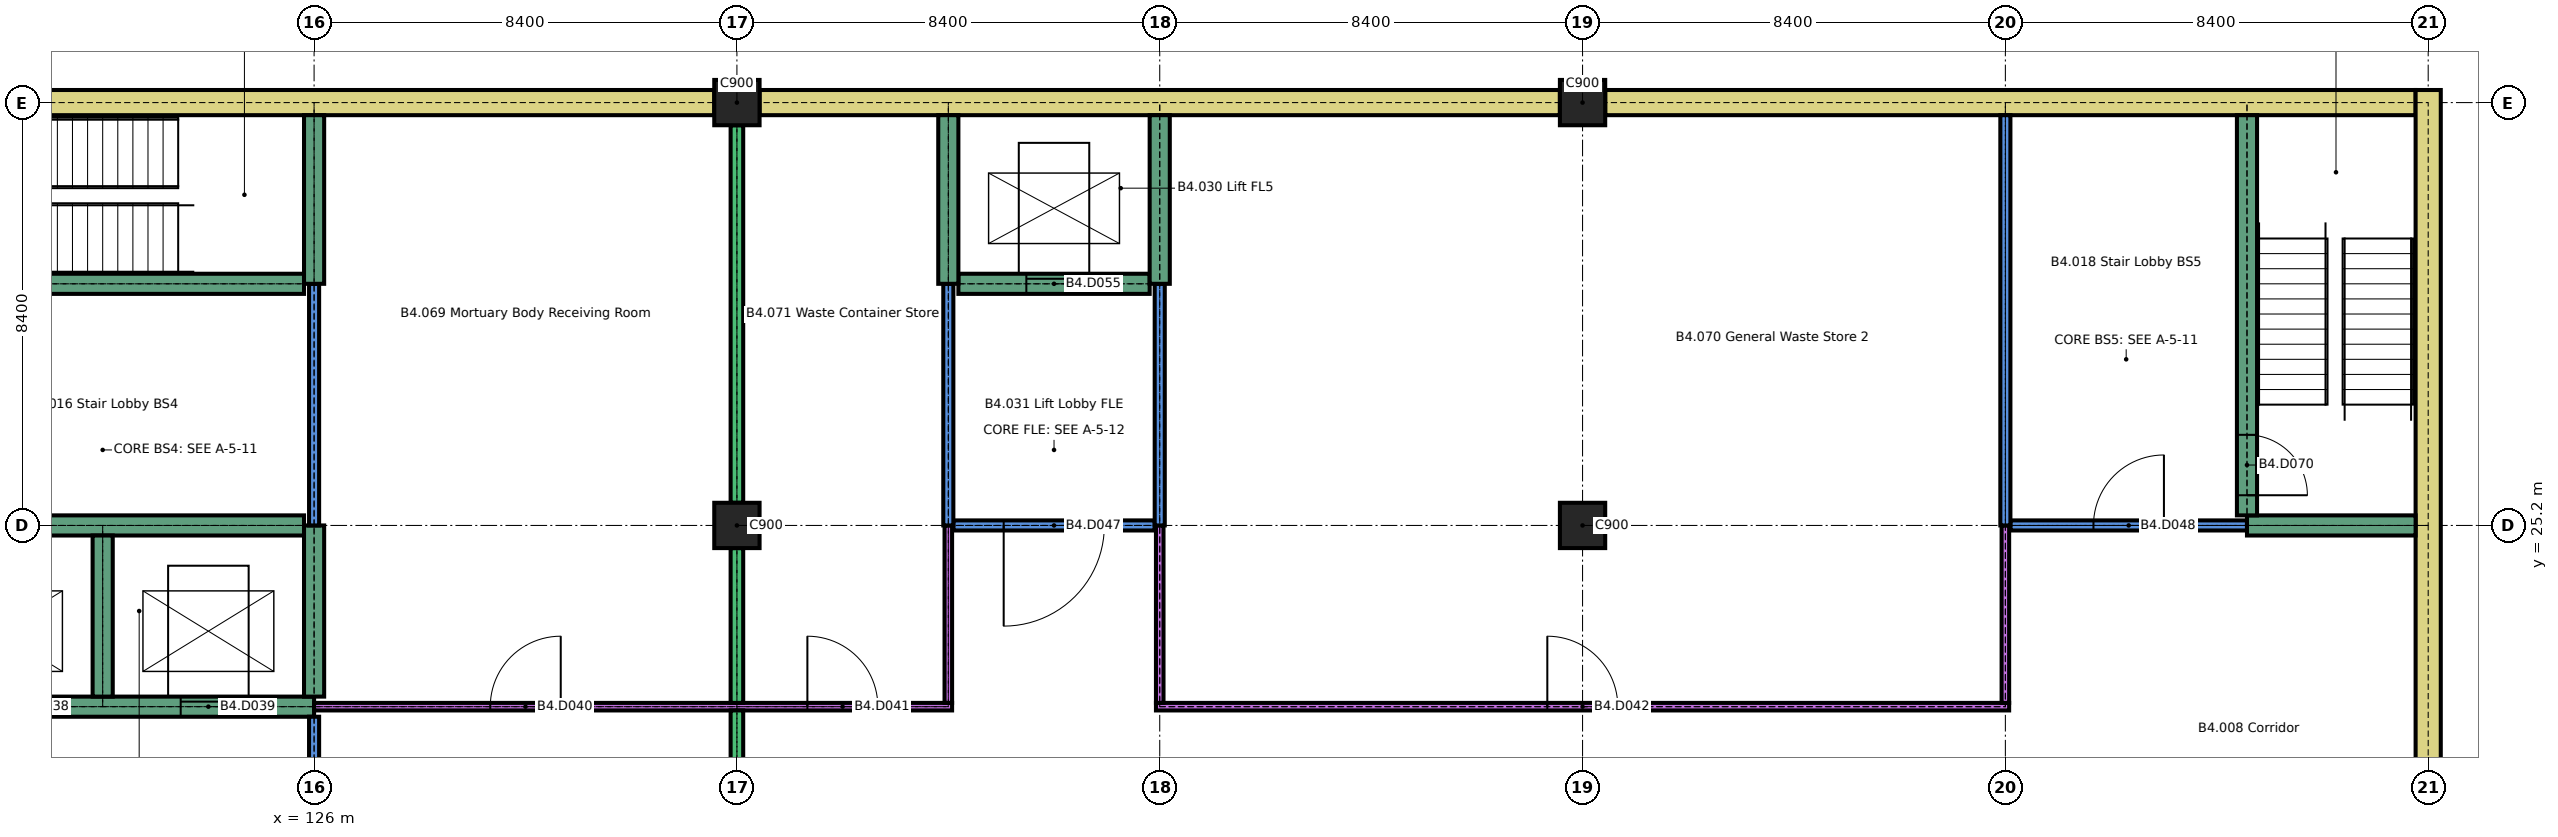
"""IFC4 building model, lengths in metres.
Left out: names, types, materials, properties, quantities, classifications, styles, units other than length and angle.
Written with IfcOpenShell. Run it as: python <this file> out.ifc"""

import sys

from ifc_helpers import new_model, si_unit, direction, frame, frame_2d, origin, origin_2d, place, context, subcontext, project, spatial, rectangle, extrude, element, fill, save


model = new_model("IFC4")
c1 = context("Model", 3, precision=1e-05, world=origin(), true_north=direction((0.0, 1.0)))
c2 = subcontext(c1, "Body", "Model", "MODEL_VIEW")
j1 = project(units=[si_unit("LENGTHUNIT", "METRE"), si_unit("PLANEANGLEUNIT", "RADIAN")], contexts=[c1])
p1 = place(None, origin())
s1 = spatial("IfcSite", under=j1, at=p1, CompositionType="ELEMENT")
p2 = place(p1, origin())
s2 = spatial("IfcBuilding", under=s1, at=p2, CompositionType="ELEMENT")
p3 = place(p2, frame((0.0, 0.0, -15.0)))
s3 = spatial("IfcBuildingStorey", under=s2, at=p3, CompositionType="ELEMENT", Elevation=-15.0)
for number, where, z_axis, x_axis in (
    (1, (134.4, 25.2, 0.0), (0.0, 0.0, 1.0), (1.0, 0.0, 0.0)),
    (2, (151.2, 25.2, 0.0), (0.0, 0.0, 1.0), (1.0, 0.0, 0.0)),
    (3, (134.4, 33.6, 0.0), (0.0, 0.0, 1.0), (1.0, 0.0, 0.0)),
    (4, (151.2, 33.6, 0.0), (0.0, 0.0, 1.0), (1.0, 0.0, 0.0)),
):
    element("IfcColumn", number, at=place(p3, frame(where, z_axis=z_axis, x_axis=x_axis)), inside=s3, PredefinedType="COLUMN", context=c2, shape_type="SweptSolid", body=[
        extrude(rectangle(XDim=0.9, YDim=0.9, at=origin_2d()), origin(), (0.0, 0.0, 1.0), 3.2),
    ])
p4 = place(p3, frame((101.25, 33.6, 0.0), z_axis=(0.0, 0.0, 1.0), x_axis=(1.0, 0.0, 0.0)))
e5 = element("IfcWall", 5, at=p4, inside=s3, PredefinedType="SOLIDWALL", context=c2, shape_type="SweptSolid", body=[
    extrude(rectangle(XDim=32.7, YDim=0.5, at=frame_2d((16.35, 0.0))), origin(), (0.0, 0.0, 1.0), 3.2),
])
p5 = place(p3, frame((134.85, 33.6, 0.0), z_axis=(0.0, 0.0, 1.0), x_axis=(1.0, 0.0, 0.0)))
e6 = element("IfcWall", 6, at=p5, inside=s3, PredefinedType="SOLIDWALL", context=c2, shape_type="SweptSolid", body=[
    extrude(rectangle(XDim=15.9, YDim=0.5, at=frame_2d((7.95, 0.0))), origin(), (0.0, 0.0, 1.0), 3.2),
])
p6 = place(p3, frame((151.65, 33.6, 0.0), z_axis=(0.0, 0.0, 1.0), x_axis=(1.0, 0.0, 0.0)))
e7 = element("IfcWall", 7, at=p6, inside=s3, PredefinedType="SOLIDWALL", context=c2, shape_type="SweptSolid", body=[
    extrude(rectangle(XDim=16.1, YDim=0.5, at=frame_2d((8.05, 0.0))), origin(), (0.0, 0.0, 1.0), 3.2),
])
p7 = place(p3, frame((168.0, 17.25, 0.0), z_axis=(0.0, 0.0, 1.0), x_axis=(0.0, 1.0, 0.0)))
e8 = element("IfcWall", 8, at=p7, inside=s3, PredefinedType="SOLIDWALL", context=c2, shape_type="SweptSolid", body=[
    extrude(rectangle(XDim=16.6, YDim=0.5, at=frame_2d((8.3, 0.0))), origin(), (0.0, 0.0, 1.0), 3.2),
])
p8 = place(p3, frame((117.8, 21.6, 0.0), z_axis=(0.0, 0.0, 1.0), x_axis=(1.0, 0.0, 0.0)))
e9 = element("IfcWall", 9, at=p8, inside=s3, PredefinedType="SHEAR", context=c2, shape_type="SweptSolid", body=[
    extrude(rectangle(XDim=8.2, YDim=0.4, at=frame_2d((4.1, 0.0))), origin(), (0.0, 0.0, 1.0), 3.2),
])
p9 = place(p8, frame((1.45, 0.0, 0.0)))
e10 = element("IfcOpeningElement", 10, at=p9, cuts=e9, PredefinedType="OPENING", context=c2, shape_type="SweptSolid", body=[
    extrude(rectangle(XDim=1.1, YDim=2.1, at=frame_2d((0.55, 1.05))), frame((0.0, 0.21, 0.0), z_axis=(0.0, -1.0, 0.0), x_axis=(1.0, 0.0, 0.0)), (0.0, 0.0, 1.0), 0.42),
])
p10 = place(p8, frame((5.55, 0.0, 0.0)))
e11 = element("IfcOpeningElement", 11, at=p10, cuts=e9, PredefinedType="OPENING", context=c2, shape_type="SweptSolid", body=[
    extrude(rectangle(XDim=1.1, YDim=2.1, at=frame_2d((0.55, 1.05))), frame((0.0, 0.21, 0.0), z_axis=(0.0, -1.0, 0.0), x_axis=(1.0, 0.0, 0.0)), (0.0, 0.0, 1.0), 0.42),
])
p11 = place(p3, frame((126.0, 21.6, 0.0), z_axis=(0.0, 0.0, 1.0), x_axis=(1.0, 0.0, 0.0)))
e12 = element("IfcWall", 12, at=p11, inside=s3, PredefinedType="PARTITIONING", context=c2, shape_type="SweptSolid", body=[
    extrude(rectangle(XDim=12.675, YDim=0.15, at=frame_2d((6.337, 0.0))), origin(), (0.0, 0.0, 1.0), 3.2),
])
p12 = place(p11, frame((3.5, 0.0, 0.0)))
e13 = element("IfcOpeningElement", 13, at=p12, cuts=e12, PredefinedType="OPENING", context=c2, shape_type="SweptSolid", body=[
    extrude(rectangle(XDim=1.4, YDim=2.1, at=frame_2d((0.7, 1.05))), frame((0.0, 0.085, 0.0), z_axis=(0.0, -1.0, 0.0), x_axis=(1.0, 0.0, 0.0)), (0.0, 0.0, 1.0), 0.17),
])
p13 = place(p11, frame((9.8, 0.0, 0.0)))
e14 = element("IfcOpeningElement", 14, at=p13, cuts=e12, PredefinedType="OPENING", context=c2, shape_type="SweptSolid", body=[
    extrude(rectangle(XDim=1.4, YDim=2.1, at=frame_2d((0.7, 1.05))), frame((0.0, 0.085, 0.0), z_axis=(0.0, -1.0, 0.0), x_axis=(1.0, 0.0, 0.0)), (0.0, 0.0, 1.0), 0.17),
])
p14 = place(p3, frame((142.725, 21.6, 0.0), z_axis=(0.0, 0.0, 1.0), x_axis=(1.0, 0.0, 0.0)))
e15 = element("IfcWall", 15, at=p14, inside=s3, PredefinedType="PARTITIONING", context=c2, shape_type="SweptSolid", body=[
    extrude(rectangle(XDim=16.95, YDim=0.15, at=frame_2d((8.475, 0.0))), origin(), (0.0, 0.0, 1.0), 3.2),
])
p15 = place(p14, frame((7.775, 0.0, 0.0)))
e16 = element("IfcOpeningElement", 16, at=p15, cuts=e15, PredefinedType="OPENING", context=c2, shape_type="SweptSolid", body=[
    extrude(rectangle(XDim=1.4, YDim=2.1, at=frame_2d((0.7, 1.05))), frame((0.0, 0.085, 0.0), z_axis=(0.0, -1.0, 0.0), x_axis=(1.0, 0.0, 0.0)), (0.0, 0.0, 1.0), 0.17),
])
p16 = place(p3, frame((117.8, 25.2, 0.0), z_axis=(0.0, 0.0, 1.0), x_axis=(1.0, 0.0, 0.0)))
e17 = element("IfcWall", 17, at=p16, inside=s3, PredefinedType="SHEAR", context=c2, shape_type="SweptSolid", body=[
    extrude(rectangle(XDim=8.0, YDim=0.4, at=frame_2d((4.0, 0.0))), origin(), (0.0, 0.0, 1.0), 3.2),
])
p17 = place(p3, frame((138.7, 25.2, 0.0), z_axis=(0.0, 0.0, 1.0), x_axis=(1.0, 0.0, 0.0)))
e18 = element("IfcWall", 18, at=p17, inside=s3, PredefinedType="PARTITIONING", context=c2, shape_type="SweptSolid", body=[
    extrude(rectangle(XDim=4.0, YDim=0.2, at=frame_2d((2.0, 0.0))), origin(), (0.0, 0.0, 1.0), 3.2),
])
p18 = place(p17, frame((1.0, 0.0, 0.0)))
e19 = element("IfcOpeningElement", 19, at=p18, cuts=e18, PredefinedType="OPENING", context=c2, shape_type="SweptSolid", body=[
    extrude(rectangle(XDim=2.0, YDim=2.4, at=frame_2d((1.0, 1.2))), frame((0.0, 0.11, 0.0), z_axis=(0.0, -1.0, 0.0), x_axis=(1.0, 0.0, 0.0)), (0.0, 0.0, 1.0), 0.22),
])
p19 = place(p3, frame((159.7, 25.2, 0.0), z_axis=(0.0, 0.0, 1.0), x_axis=(1.0, 0.0, 0.0)))
e20 = element("IfcWall", 20, at=p19, inside=s3, PredefinedType="PARTITIONING", context=c2, shape_type="SweptSolid", body=[
    extrude(rectangle(XDim=4.7, YDim=0.2, at=frame_2d((2.35, 0.0))), origin(), (0.0, 0.0, 1.0), 3.2),
])
p20 = place(p19, frame((1.65, 0.0, 0.0)))
e21 = element("IfcOpeningElement", 21, at=p20, cuts=e20, PredefinedType="OPENING", context=c2, shape_type="SweptSolid", body=[
    extrude(rectangle(XDim=1.4, YDim=2.1, at=frame_2d((0.7, 1.05))), frame((0.0, 0.11, 0.0), z_axis=(0.0, -1.0, 0.0), x_axis=(1.0, 0.0, 0.0)), (0.0, 0.0, 1.0), 0.22),
])
p21 = place(p3, frame((164.4, 25.2, 0.0), z_axis=(0.0, 0.0, 1.0), x_axis=(1.0, 0.0, 0.0)))
e22 = element("IfcWall", 22, at=p21, inside=s3, PredefinedType="SHEAR", context=c2, shape_type="SweptSolid", body=[
    extrude(rectangle(XDim=3.35, YDim=0.4, at=frame_2d((1.675, 0.0))), origin(), (0.0, 0.0, 1.0), 3.2),
])
p22 = place(p3, frame((117.6, 30.0, 0.0), z_axis=(0.0, 0.0, 1.0), x_axis=(1.0, 0.0, 0.0)))
e23 = element("IfcWall", 23, at=p22, inside=s3, PredefinedType="SHEAR", context=c2, shape_type="SweptSolid", body=[
    extrude(rectangle(XDim=8.2, YDim=0.4, at=frame_2d((4.1, 0.0))), origin(), (0.0, 0.0, 1.0), 3.2),
])
p23 = place(p22, frame((0.6, 0.0, 0.0)))
e24 = element("IfcOpeningElement", 24, at=p23, cuts=e23, PredefinedType="OPENING", context=c2, shape_type="SweptSolid", body=[
    extrude(rectangle(XDim=1.2, YDim=2.1, at=frame_2d((0.6, 1.05))), frame((0.0, 0.21, 0.0), z_axis=(0.0, -1.0, 0.0), x_axis=(1.0, 0.0, 0.0)), (0.0, 0.0, 1.0), 0.42),
])
p24 = place(p3, frame((138.8, 30.0, 0.0), z_axis=(0.0, 0.0, 1.0), x_axis=(1.0, 0.0, 0.0)))
e25 = element("IfcWall", 25, at=p24, inside=s3, PredefinedType="SHEAR", context=c2, shape_type="SweptSolid", body=[
    extrude(rectangle(XDim=3.8, YDim=0.4, at=frame_2d((1.9, 0.0))), origin(), (0.0, 0.0, 1.0), 3.2),
])
p25 = place(p24, frame((1.35, 0.0, 0.0)))
e26 = element("IfcOpeningElement", 26, at=p25, cuts=e25, PredefinedType="OPENING", context=c2, shape_type="SweptSolid", body=[
    extrude(rectangle(XDim=1.1, YDim=2.1, at=frame_2d((0.55, 1.05))), frame((0.0, 0.21, 0.0), z_axis=(0.0, -1.0, 0.0), x_axis=(1.0, 0.0, 0.0)), (0.0, 0.0, 1.0), 0.42),
])
p26 = place(p3, frame((121.8, 21.8, 0.0), z_axis=(0.0, 0.0, 1.0), x_axis=(0.0, 1.0, 0.0)))
e27 = element("IfcWall", 27, at=p26, inside=s3, PredefinedType="SHEAR", context=c2, shape_type="SweptSolid", body=[
    extrude(rectangle(XDim=3.2, YDim=0.4, at=frame_2d((1.6, 0.0))), origin(), (0.0, 0.0, 1.0), 3.2),
])
p27 = place(p3, frame((126.0, 16.9, 0.0), z_axis=(0.0, 0.0, 1.0), x_axis=(0.0, 1.0, 0.0)))
e28 = element("IfcWall", 28, at=p27, inside=s3, PredefinedType="PARTITIONING", context=c2, shape_type="SweptSolid", body=[
    extrude(rectangle(XDim=4.5, YDim=0.2, at=frame_2d((2.25, 0.0))), origin(), (0.0, 0.0, 1.0), 3.2),
])
p28 = place(p27, frame((1.25, 0.0, 0.0)))
e29 = element("IfcOpeningElement", 29, at=p28, cuts=e28, PredefinedType="OPENING", context=c2, shape_type="SweptSolid", body=[
    extrude(rectangle(XDim=2.0, YDim=2.4, at=frame_2d((1.0, 1.2))), frame((0.0, 0.11, 0.0), z_axis=(0.0, -1.0, 0.0), x_axis=(1.0, 0.0, 0.0)), (0.0, 0.0, 1.0), 0.22),
])
p29 = place(p3, frame((126.0, 21.8, 0.0), z_axis=(0.0, 0.0, 1.0), x_axis=(0.0, 1.0, 0.0)))
e30 = element("IfcWall", 30, at=p29, inside=s3, PredefinedType="SHEAR", context=c2, shape_type="SweptSolid", body=[
    extrude(rectangle(XDim=3.4, YDim=0.4, at=frame_2d((1.7, 0.0))), origin(), (0.0, 0.0, 1.0), 3.2),
])
p30 = place(p3, frame((126.0, 25.2, 0.0), z_axis=(0.0, 0.0, 1.0), x_axis=(0.0, 1.0, 0.0)))
e31 = element("IfcWall", 31, at=p30, inside=s3, PredefinedType="PARTITIONING", context=c2, shape_type="SweptSolid", body=[
    extrude(rectangle(XDim=4.8, YDim=0.2, at=frame_2d((2.4, 0.0))), origin(), (0.0, 0.0, 1.0), 3.2),
])
p31 = place(p3, frame((126.0, 30.0, 0.0), z_axis=(0.0, 0.0, 1.0), x_axis=(0.0, 1.0, 0.0)))
e32 = element("IfcWall", 32, at=p31, inside=s3, PredefinedType="SHEAR", context=c2, shape_type="SweptSolid", body=[
    extrude(rectangle(XDim=3.35, YDim=0.4, at=frame_2d((1.675, 0.0))), origin(), (0.0, 0.0, 1.0), 3.2),
])
p32 = place(p3, frame((134.4, 17.25, 0.0), z_axis=(0.0, 0.0, 1.0), x_axis=(0.0, 1.0, 0.0)))
e33 = element("IfcWall", 33, at=p32, inside=s3, PredefinedType="SOLIDWALL", context=c2, shape_type="SweptSolid", body=[
    extrude(rectangle(XDim=4.275, YDim=0.25, at=frame_2d((2.137, 0.0))), origin(), (0.0, 0.0, 1.0), 3.2),
])
p33 = place(p32, frame((1.438, 0.0, 0.0)))
e34 = element("IfcOpeningElement", 34, at=p33, cuts=e33, PredefinedType="OPENING", context=c2, shape_type="SweptSolid", body=[
    extrude(rectangle(XDim=1.4, YDim=2.1, at=frame_2d((0.7, 1.05))), frame((0.0, 0.135, 0.0), z_axis=(0.0, -1.0, 0.0), x_axis=(1.0, 0.0, 0.0)), (0.0, 0.0, 1.0), 0.27),
])
p34 = place(p3, frame((134.4, 21.675, 0.0), z_axis=(0.0, 0.0, 1.0), x_axis=(0.0, 1.0, 0.0)))
e35 = element("IfcWall", 35, at=p34, inside=s3, PredefinedType="SOLIDWALL", context=c2, shape_type="SweptSolid", body=[
    extrude(rectangle(XDim=3.075, YDim=0.25, at=frame_2d((1.538, 0.0))), origin(), (0.0, 0.0, 1.0), 3.2),
])
p35 = place(p3, frame((134.4, 25.65, 0.0), z_axis=(0.0, 0.0, 1.0), x_axis=(0.0, 1.0, 0.0)))
e36 = element("IfcWall", 36, at=p35, inside=s3, PredefinedType="SOLIDWALL", context=c2, shape_type="SweptSolid", body=[
    extrude(rectangle(XDim=7.5, YDim=0.25, at=frame_2d((3.75, 0.0))), origin(), (0.0, 0.0, 1.0), 3.2),
])
p36 = place(p3, frame((138.6, 21.675, 0.0), z_axis=(0.0, 0.0, 1.0), x_axis=(0.0, 1.0, 0.0)))
e37 = element("IfcWall", 37, at=p36, inside=s3, PredefinedType="PARTITIONING", context=c2, shape_type="SweptSolid", body=[
    extrude(rectangle(XDim=3.525, YDim=0.15, at=frame_2d((1.762, 0.0))), origin(), (0.0, 0.0, 1.0), 3.2),
])
p37 = place(p3, frame((138.6, 25.2, 0.0), z_axis=(0.0, 0.0, 1.0), x_axis=(0.0, 1.0, 0.0)))
e38 = element("IfcWall", 38, at=p37, inside=s3, PredefinedType="PARTITIONING", context=c2, shape_type="SweptSolid", body=[
    extrude(rectangle(XDim=4.8, YDim=0.2, at=frame_2d((2.4, 0.0))), origin(), (0.0, 0.0, 1.0), 3.2),
])
p38 = place(p3, frame((138.6, 30.0, 0.0), z_axis=(0.0, 0.0, 1.0), x_axis=(0.0, 1.0, 0.0)))
e39 = element("IfcWall", 39, at=p38, inside=s3, PredefinedType="SHEAR", context=c2, shape_type="SweptSolid", body=[
    extrude(rectangle(XDim=3.35, YDim=0.4, at=frame_2d((1.675, 0.0))), origin(), (0.0, 0.0, 1.0), 3.2),
])
p39 = place(p3, frame((142.8, 21.675, 0.0), z_axis=(0.0, 0.0, 1.0), x_axis=(0.0, 1.0, 0.0)))
e40 = element("IfcWall", 40, at=p39, inside=s3, PredefinedType="PARTITIONING", context=c2, shape_type="SweptSolid", body=[
    extrude(rectangle(XDim=3.525, YDim=0.15, at=frame_2d((1.762, 0.0))), origin(), (0.0, 0.0, 1.0), 3.2),
])
p40 = place(p3, frame((142.8, 25.2, 0.0), z_axis=(0.0, 0.0, 1.0), x_axis=(0.0, 1.0, 0.0)))
e41 = element("IfcWall", 41, at=p40, inside=s3, PredefinedType="PARTITIONING", context=c2, shape_type="SweptSolid", body=[
    extrude(rectangle(XDim=4.8, YDim=0.2, at=frame_2d((2.4, 0.0))), origin(), (0.0, 0.0, 1.0), 3.2),
])
p41 = place(p3, frame((142.8, 30.0, 0.0), z_axis=(0.0, 0.0, 1.0), x_axis=(0.0, 1.0, 0.0)))
e42 = element("IfcWall", 42, at=p41, inside=s3, PredefinedType="SHEAR", context=c2, shape_type="SweptSolid", body=[
    extrude(rectangle(XDim=3.35, YDim=0.4, at=frame_2d((1.675, 0.0))), origin(), (0.0, 0.0, 1.0), 3.2),
])
p42 = place(p3, frame((159.6, 21.675, 0.0), z_axis=(0.0, 0.0, 1.0), x_axis=(0.0, 1.0, 0.0)))
e43 = element("IfcWall", 43, at=p42, inside=s3, PredefinedType="PARTITIONING", context=c2, shape_type="SweptSolid", body=[
    extrude(rectangle(XDim=3.525, YDim=0.15, at=frame_2d((1.762, 0.0))), origin(), (0.0, 0.0, 1.0), 3.2),
])
p43 = place(p3, frame((159.6, 25.2, 0.0), z_axis=(0.0, 0.0, 1.0), x_axis=(0.0, 1.0, 0.0)))
e44 = element("IfcWall", 44, at=p43, inside=s3, PredefinedType="PARTITIONING", context=c2, shape_type="SweptSolid", body=[
    extrude(rectangle(XDim=8.15, YDim=0.2, at=frame_2d((4.075, 0.0))), origin(), (0.0, 0.0, 1.0), 3.2),
])
p44 = place(p3, frame((164.4, 25.4, 0.0), z_axis=(0.0, 0.0, 1.0), x_axis=(0.0, 1.0, 0.0)))
e45 = element("IfcWall", 45, at=p44, inside=s3, PredefinedType="SHEAR", context=c2, shape_type="SweptSolid", body=[
    extrude(rectangle(XDim=7.95, YDim=0.4, at=frame_2d((3.975, 0.0))), origin(), (0.0, 0.0, 1.0), 3.2),
])
p45 = place(p44, frame((0.4, 0.0, 0.0)))
e46 = element("IfcOpeningElement", 46, at=p45, cuts=e45, PredefinedType="OPENING", context=c2, shape_type="SweptSolid", body=[
    extrude(rectangle(XDim=1.2, YDim=2.1, at=frame_2d((0.6, 1.05))), frame((0.0, 0.21, 0.0), z_axis=(0.0, -1.0, 0.0), x_axis=(1.0, 0.0, 0.0)), (0.0, 0.0, 1.0), 0.42),
])
p46 = place(p10, origin())
e47 = element("IfcDoor", 47, at=p46, inside=s3, OperationType="SLIDING_TO_LEFT", PredefinedType="DOOR", context=c2, shape_type="SweptSolid", body=[
    extrude(rectangle(XDim=1.1, YDim=2.1, at=frame_2d((0.55, 1.05))), frame((0.0, 0.025, 0.0), z_axis=(0.0, -1.0, 0.0), x_axis=(1.0, 0.0, 0.0)), (0.0, 0.0, 1.0), 0.05),
])
fill(e11, e47)
p47 = place(p12, origin())
e48 = element("IfcDoor", 48, at=p47, inside=s3, OperationType="SINGLE_SWING_LEFT", PredefinedType="DOOR", context=c2, shape_type="SweptSolid", body=[
    extrude(rectangle(XDim=1.4, YDim=2.1, at=frame_2d((0.7, 1.05))), frame((0.0, 0.025, 0.0), z_axis=(0.0, -1.0, 0.0), x_axis=(1.0, 0.0, 0.0)), (0.0, 0.0, 1.0), 0.05),
])
fill(e13, e48)
p48 = place(p13, origin())
e49 = element("IfcDoor", 49, at=p48, inside=s3, OperationType="SINGLE_SWING_RIGHT", PredefinedType="DOOR", context=c2, shape_type="SweptSolid", body=[
    extrude(rectangle(XDim=1.4, YDim=2.1, at=frame_2d((0.7, 1.05))), frame((0.0, 0.025, 0.0), z_axis=(0.0, -1.0, 0.0), x_axis=(1.0, 0.0, 0.0)), (0.0, 0.0, 1.0), 0.05),
])
fill(e14, e49)
p49 = place(p15, origin())
e50 = element("IfcDoor", 50, at=p49, inside=s3, OperationType="SINGLE_SWING_RIGHT", PredefinedType="DOOR", context=c2, shape_type="SweptSolid", body=[
    extrude(rectangle(XDim=1.4, YDim=2.1, at=frame_2d((0.7, 1.05))), frame((0.0, 0.025, 0.0), z_axis=(0.0, -1.0, 0.0), x_axis=(1.0, 0.0, 0.0)), (0.0, 0.0, 1.0), 0.05),
])
fill(e16, e50)
p50 = place(p18, origin())
e51 = element("IfcDoor", 51, at=p50, inside=s3, OperationType="SINGLE_SWING_LEFT", PredefinedType="DOOR", context=c2, shape_type="SweptSolid", body=[
    extrude(rectangle(XDim=2.0, YDim=2.4, at=frame_2d((1.0, 1.2))), frame((0.0, 0.03, 0.0), z_axis=(0.0, -1.0, 0.0), x_axis=(1.0, 0.0, 0.0)), (0.0, 0.0, 1.0), 0.06),
])
fill(e19, e51)
p51 = place(p20, origin())
e52 = element("IfcDoor", 52, at=p51, inside=s3, OperationType="SINGLE_SWING_LEFT", PredefinedType="DOOR", context=c2, shape_type="SweptSolid", body=[
    extrude(rectangle(XDim=1.4, YDim=2.1, at=frame_2d((0.7, 1.05))), frame((0.0, 0.03, 0.0), z_axis=(0.0, -1.0, 0.0), x_axis=(1.0, 0.0, 0.0)), (0.0, 0.0, 1.0), 0.06),
])
fill(e21, e52)
p52 = place(p25, origin())
e53 = element("IfcDoor", 53, at=p52, inside=s3, OperationType="SLIDING_TO_LEFT", PredefinedType="DOOR", context=c2, shape_type="SweptSolid", body=[
    extrude(rectangle(XDim=1.1, YDim=2.1, at=frame_2d((0.55, 1.05))), frame((0.0, 0.025, 0.0), z_axis=(0.0, -1.0, 0.0), x_axis=(1.0, 0.0, 0.0)), (0.0, 0.0, 1.0), 0.05),
])
fill(e26, e53)
p53 = place(p45, origin())
e54 = element("IfcDoor", 54, at=p53, inside=s3, OperationType="SINGLE_SWING_LEFT", PredefinedType="DOOR", context=c2, shape_type="SweptSolid", body=[
    extrude(rectangle(XDim=1.2, YDim=2.1, at=frame_2d((0.6, 1.05))), frame((0.0, 0.025, 0.0), z_axis=(0.0, -1.0, 0.0), x_axis=(1.0, 0.0, 0.0)), (0.0, 0.0, 1.0), 0.05),
])
fill(e46, e54)
save(model, sys.argv[1])
